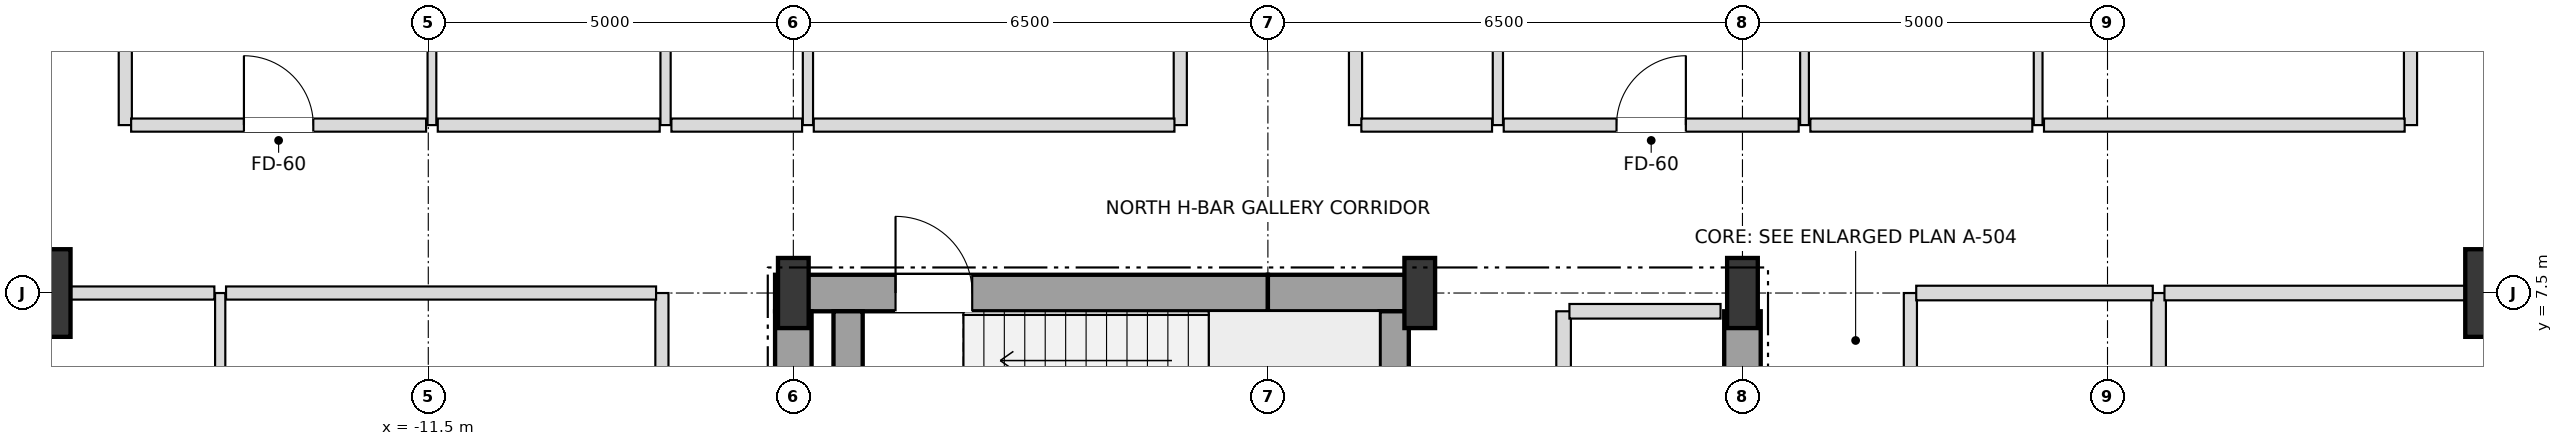
"""IFC4 building model, lengths in metres.
Left out: names, types, materials, properties, quantities, classifications, styles, units other than length and angle.
Written with IfcOpenShell. Run it as: python <this file> out.ifc"""

import sys

from ifc_helpers import new_model, si_unit, direction, frame, frame_2d, origin, origin_2d, place, context, subcontext, project, spatial, rectangle, i_section, extrude, element, fill, save


model = new_model("IFC4")
c1 = context("Model", 3, precision=1e-05, world=origin(), true_north=direction((0.0, 1.0)))
c2 = subcontext(c1, "Body", "Model", "MODEL_VIEW")
j1 = project(units=[si_unit("LENGTHUNIT", "METRE"), si_unit("PLANEANGLEUNIT", "RADIAN")], contexts=[c1])
p1 = place(None, origin())
s1 = spatial("IfcSite", under=j1, at=p1, CompositionType="ELEMENT")
p2 = place(p1, origin())
s2 = spatial("IfcBuilding", under=s1, at=p2, CompositionType="ELEMENT")
p3 = place(p2, frame((0.0, 0.0, 125.1)))
s3 = spatial("IfcBuildingStorey", under=s2, at=p3, CompositionType="ELEMENT", Elevation=125.1)
for number, where, z_axis, x_axis in (
    (1, (-6.5, 7.5, 0.0), (0.0, 0.0, 1.0), (1.0, 0.0, 0.0)),
    (2, (2.08, 7.5, 0.0), (0.0, 0.0, 1.0), (1.0, 0.0, 0.0)),
    (3, (6.5, 7.5, 0.0), (0.0, 0.0, 1.0), (1.0, 0.0, 0.0)),
):
    element("IfcColumn", number, at=place(p3, frame(where, z_axis=z_axis, x_axis=x_axis)), inside=s3, PredefinedType="COLUMN", context=c2, shape_type="SweptSolid", body=[
        extrude(i_section(OverallWidth=0.42, OverallDepth=0.96, WebThickness=0.022, FlangeThickness=0.034, at=origin_2d()), origin(), (0.0, 0.0, 1.0), 4.5),
    ])
for number, where, z_axis, x_axis in (
    (4, (17.0, 7.5, 0.0), (0.0, 0.0, 1.0), (1.0, 0.0, 0.0)),
    (5, (-17.0, 7.5, 0.0), (0.0, 0.0, 1.0), (1.0, 0.0, 0.0)),
):
    element("IfcColumn", number, at=place(p3, frame(where, z_axis=z_axis, x_axis=x_axis)), inside=s3, PredefinedType="USERDEFINED", context=c2, shape_type="SweptSolid", body=[
        extrude(rectangle(XDim=1.2, YDim=1.2, at=origin_2d()), origin(), (0.0, 0.0, 1.0), 4.5),
    ])
p4 = place(p3, frame((-6.75, 7.5, 0.0), z_axis=(0.0, 0.0, 1.0), x_axis=(1.0, 0.0, 0.0)))
e6 = element("IfcWall", 6, at=p4, inside=s3, PredefinedType="SHEAR", context=c2, shape_type="SweptSolid", body=[
    extrude(rectangle(XDim=6.75, YDim=0.5, at=frame_2d((3.375, 0.0))), origin(), (0.0, 0.0, 1.0), 4.28),
])
p5 = place(p4, frame((1.65, 0.0, 0.0)))
e7 = element("IfcOpeningElement", 7, at=p5, cuts=e6, PredefinedType="OPENING", context=c2, shape_type="SweptSolid", body=[
    extrude(rectangle(XDim=1.05, YDim=2.15, at=frame_2d((0.525, 1.075))), frame((0.0, 0.26, 0.0), z_axis=(0.0, -1.0, 0.0), x_axis=(1.0, 0.0, 0.0)), (0.0, 0.0, 1.0), 0.52),
])
p6 = place(p3, frame((0.0, 7.5, 0.0), z_axis=(0.0, 0.0, 1.0), x_axis=(1.0, 0.0, 0.0)))
e8 = element("IfcWall", 8, at=p6, inside=s3, PredefinedType="SHEAR", context=c2, shape_type="SweptSolid", body=[
    extrude(rectangle(XDim=2.08, YDim=0.5, at=frame_2d((1.04, 0.0))), origin(), (0.0, 0.0, 1.0), 4.28),
])
for number, where, z_axis, x_axis in (
    (9, (-6.5, 3.95, 0.0), (0.0, 0.0, 1.0), (0.0, 1.0, 0.0)),
    (10, (6.5, 3.95, 0.0), (0.0, 0.0, 1.0), (0.0, 1.0, 0.0)),
):
    element("IfcWall", number, at=place(p3, frame(where, z_axis=z_axis, x_axis=x_axis)), inside=s3, PredefinedType="SHEAR", context=c2, shape_type="SweptSolid", body=[
        extrude(rectangle(XDim=3.3, YDim=0.5, at=frame_2d((1.65, 0.0))), origin(), (0.0, 0.0, 1.0), 4.28),
    ])
for number, where, z_axis, x_axis in (
    (11, (1.73, 3.95, 0.0), (0.0, 0.0, 1.0), (0.0, 1.0, 0.0)),
    (12, (-5.75, 3.95, 0.0), (0.0, 0.0, 1.0), (0.0, 1.0, 0.0)),
):
    element("IfcWall", number, at=place(p3, frame(where, z_axis=z_axis, x_axis=x_axis)), inside=s3, PredefinedType="SHEAR", context=c2, shape_type="SweptSolid", body=[
        extrude(rectangle(XDim=3.3, YDim=0.4, at=frame_2d((1.65, 0.0))), origin(), (0.0, 0.0, 1.0), 4.28),
    ])
p7 = place(p3, frame((-15.65, 9.8, 0.0), z_axis=(0.0, 0.0, 1.0), x_axis=(0.0, 1.0, 0.0)))
e13 = element("IfcWall", 13, at=p7, inside=s3, PredefinedType="PARTITIONING", context=c2, shape_type="SweptSolid", body=[
    extrude(rectangle(XDim=7.35, YDim=0.18, at=frame_2d((3.675, 0.0))), origin(), (0.0, 0.0, 1.0), 3.636),
])
p8 = place(p3, frame((-14.35, -7.5, 0.0), z_axis=(0.0, 0.0, 1.0), x_axis=(0.0, 1.0, 0.0)))
e14 = element("IfcWall", 14, at=p8, inside=s3, PredefinedType="PARTITIONING", context=c2, shape_type="SweptSolid", body=[
    extrude(rectangle(XDim=15.0, YDim=0.14, at=frame_2d((7.5, 0.0))), origin(), (0.0, 0.0, 1.0), 4.28),
])
p9 = place(p8, frame((3.475, 0.0, 0.0)))
e15 = element("IfcOpeningElement", 15, at=p9, cuts=e14, PredefinedType="OPENING", context=c2, shape_type="SweptSolid", body=[
    extrude(rectangle(XDim=0.95, YDim=2.1, at=frame_2d((0.475, 1.05))), frame((0.0, 0.08, 0.0), z_axis=(0.0, -1.0, 0.0), x_axis=(1.0, 0.0, 0.0)), (0.0, 0.0, 1.0), 0.16),
])
p10 = place(p3, frame((-11.45, 9.8, 0.0), z_axis=(0.0, 0.0, 1.0), x_axis=(0.0, 1.0, 0.0)))
e16 = element("IfcWall", 16, at=p10, inside=s3, PredefinedType="PARTITIONING", context=c2, shape_type="SweptSolid", body=[
    extrude(rectangle(XDim=7.35, YDim=0.12, at=frame_2d((3.675, 0.0))), origin(), (0.0, 0.0, 1.0), 3.636),
])
p11 = place(p10, frame((3.713, 0.0, 0.0)))
e17 = element("IfcOpeningElement", 17, at=p11, cuts=e16, PredefinedType="OPENING", context=c2, shape_type="SweptSolid", body=[
    extrude(rectangle(XDim=0.95, YDim=2.1, at=frame_2d((0.475, 1.05))), frame((0.0, 0.07, 0.0), z_axis=(0.0, -1.0, 0.0), x_axis=(1.0, 0.0, 0.0)), (0.0, 0.0, 1.0), 0.14),
])
p12 = place(p3, frame((-8.3, -7.5, 0.0), z_axis=(0.0, 0.0, 1.0), x_axis=(0.0, 1.0, 0.0)))
e18 = element("IfcWall", 18, at=p12, inside=s3, PredefinedType="PARTITIONING", context=c2, shape_type="SweptSolid", body=[
    extrude(rectangle(XDim=15.0, YDim=0.18, at=frame_2d((7.5, 0.0))), origin(), (0.0, 0.0, 1.0), 4.28),
])
p13 = place(p12, frame((2.495, 0.0, 0.0)))
e19 = element("IfcOpeningElement", 19, at=p13, cuts=e18, PredefinedType="OPENING", context=c2, shape_type="SweptSolid", body=[
    extrude(rectangle(XDim=0.95, YDim=2.15, at=frame_2d((0.475, 1.075))), frame((0.0, 0.1, 0.0), z_axis=(0.0, -1.0, 0.0), x_axis=(1.0, 0.0, 0.0)), (0.0, 0.0, 1.0), 0.2),
])
p14 = place(p3, frame((-8.25, 9.8, 0.0), z_axis=(0.0, 0.0, 1.0), x_axis=(0.0, 1.0, 0.0)))
e20 = element("IfcWall", 20, at=p14, inside=s3, PredefinedType="PARTITIONING", context=c2, shape_type="SweptSolid", body=[
    extrude(rectangle(XDim=7.35, YDim=0.14, at=frame_2d((3.675, 0.0))), origin(), (0.0, 0.0, 1.0), 3.716),
])
p15 = place(p14, frame((3.22, 0.0, 0.0)))
e21 = element("IfcOpeningElement", 21, at=p15, cuts=e20, PredefinedType="OPENING", context=c2, shape_type="SweptSolid", body=[
    extrude(rectangle(XDim=0.9, YDim=2.1, at=frame_2d((0.45, 1.05))), frame((0.0, 0.08, 0.0), z_axis=(0.0, -1.0, 0.0), x_axis=(1.0, 0.0, 0.0)), (0.0, 0.0, 1.0), 0.16),
])
p16 = place(p3, frame((-6.3, 9.8, 0.0), z_axis=(0.0, 0.0, 1.0), x_axis=(0.0, 1.0, 0.0)))
e22 = element("IfcWall", 22, at=p16, inside=s3, PredefinedType="PARTITIONING", context=c2, shape_type="SweptSolid", body=[
    extrude(rectangle(XDim=13.35, YDim=0.14, at=frame_2d((6.675, 0.0))), origin(), (0.0, 0.0, 1.0), 3.716),
])
p17 = place(p16, frame((11.051, 0.0, 0.0)))
e23 = element("IfcOpeningElement", 23, at=p17, cuts=e22, PredefinedType="OPENING", context=c2, shape_type="SweptSolid", body=[
    extrude(rectangle(XDim=0.9, YDim=2.1, at=frame_2d((0.45, 1.05))), frame((0.0, 0.08, 0.0), z_axis=(0.0, -1.0, 0.0), x_axis=(1.0, 0.0, 0.0)), (0.0, 0.0, 1.0), 0.16),
])
for number, where, z_axis, x_axis in (
    (24, (-1.2, 9.8, 0.0), (0.0, 0.0, 1.0), (0.0, 1.0, 0.0)),
    (25, (1.2, 9.8, 0.0), (0.0, 0.0, 1.0), (0.0, 1.0, 0.0)),
):
    element("IfcWall", number, at=place(p3, frame(where, z_axis=z_axis, x_axis=x_axis)), inside=s3, PredefinedType="PARTITIONING", context=c2, shape_type="SweptSolid", body=[
        extrude(rectangle(XDim=13.35, YDim=0.18, at=frame_2d((6.675, 0.0))), origin(), (0.0, 0.0, 1.0), 3.716),
    ])
p18 = place(p3, frame((3.15, 9.8, 0.0), z_axis=(0.0, 0.0, 1.0), x_axis=(0.0, 1.0, 0.0)))
e26 = element("IfcWall", 26, at=p18, inside=s3, PredefinedType="PARTITIONING", context=c2, shape_type="SweptSolid", body=[
    extrude(rectangle(XDim=7.35, YDim=0.14, at=frame_2d((3.675, 0.0))), origin(), (0.0, 0.0, 1.0), 4.28),
])
p19 = place(p18, frame((3.22, 0.0, 0.0)))
e27 = element("IfcOpeningElement", 27, at=p19, cuts=e26, PredefinedType="OPENING", context=c2, shape_type="SweptSolid", body=[
    extrude(rectangle(XDim=0.9, YDim=2.1, at=frame_2d((0.45, 1.05))), frame((0.0, 0.08, 0.0), z_axis=(0.0, -1.0, 0.0), x_axis=(1.0, 0.0, 0.0)), (0.0, 0.0, 1.0), 0.16),
])
p20 = place(p3, frame((4.05, 4.2, 0.0), z_axis=(0.0, 0.0, 1.0), x_axis=(0.0, 1.0, 0.0)))
e28 = element("IfcWall", 28, at=p20, inside=s3, PredefinedType="SOLIDWALL", context=c2, shape_type="SweptSolid", body=[
    extrude(rectangle(XDim=3.05, YDim=0.2, at=frame_2d((1.525, 0.0))), origin(), (0.0, 0.0, 1.0), 4.28),
])
p21 = place(p20, frame((0.975, 0.0, 0.0)))
e29 = element("IfcOpeningElement", 29, at=p21, cuts=e28, PredefinedType="OPENING", context=c2, shape_type="SweptSolid", body=[
    extrude(rectangle(XDim=0.95, YDim=2.15, at=frame_2d((0.475, 1.075))), frame((0.0, 0.11, 0.0), z_axis=(0.0, -1.0, 0.0), x_axis=(1.0, 0.0, 0.0)), (0.0, 0.0, 1.0), 0.22),
])
p22 = place(p3, frame((7.35, 9.8, 0.0), z_axis=(0.0, 0.0, 1.0), x_axis=(0.0, 1.0, 0.0)))
e30 = element("IfcWall", 30, at=p22, inside=s3, PredefinedType="PARTITIONING", context=c2, shape_type="SweptSolid", body=[
    extrude(rectangle(XDim=13.35, YDim=0.12, at=frame_2d((6.675, 0.0))), origin(), (0.0, 0.0, 1.0), 3.716),
])
p23 = place(p22, frame((3.195, 0.0, 0.0)))
e31 = element("IfcOpeningElement", 31, at=p23, cuts=e30, PredefinedType="OPENING", context=c2, shape_type="SweptSolid", body=[
    extrude(rectangle(XDim=0.95, YDim=2.1, at=frame_2d((0.475, 1.05))), frame((0.0, 0.07, 0.0), z_axis=(0.0, -1.0, 0.0), x_axis=(1.0, 0.0, 0.0)), (0.0, 0.0, 1.0), 0.14),
])
p24 = place(p22, frame((11.051, 0.0, 0.0)))
e32 = element("IfcOpeningElement", 32, at=p24, cuts=e30, PredefinedType="OPENING", context=c2, shape_type="SweptSolid", body=[
    extrude(rectangle(XDim=0.9, YDim=2.1, at=frame_2d((0.45, 1.05))), frame((0.0, 0.07, 0.0), z_axis=(0.0, -1.0, 0.0), x_axis=(1.0, 0.0, 0.0)), (0.0, 0.0, 1.0), 0.14),
])
p25 = place(p3, frame((8.8, -7.5, 0.0), z_axis=(0.0, 0.0, 1.0), x_axis=(0.0, 1.0, 0.0)))
e33 = element("IfcWall", 33, at=p25, inside=s3, PredefinedType="PARTITIONING", context=c2, shape_type="SweptSolid", body=[
    extrude(rectangle(XDim=15.0, YDim=0.18, at=frame_2d((7.5, 0.0))), origin(), (0.0, 0.0, 1.0), 4.28),
])
p26 = place(p25, frame((2.425, 0.0, 0.0)))
e34 = element("IfcOpeningElement", 34, at=p26, cuts=e33, PredefinedType="OPENING", context=c2, shape_type="SweptSolid", body=[
    extrude(rectangle(XDim=0.95, YDim=2.15, at=frame_2d((0.475, 1.075))), frame((0.0, 0.1, 0.0), z_axis=(0.0, -1.0, 0.0), x_axis=(1.0, 0.0, 0.0)), (0.0, 0.0, 1.0), 0.2),
])
p27 = place(p25, frame((7.525, 0.0, 0.0)))
e35 = element("IfcOpeningElement", 35, at=p27, cuts=e33, PredefinedType="OPENING", context=c2, shape_type="SweptSolid", body=[
    extrude(rectangle(XDim=0.95, YDim=2.15, at=frame_2d((0.475, 1.075))), frame((0.0, 0.1, 0.0), z_axis=(0.0, -1.0, 0.0), x_axis=(1.0, 0.0, 0.0)), (0.0, 0.0, 1.0), 0.2),
])
p28 = place(p25, frame((12.225, 0.0, 0.0)))
e36 = element("IfcOpeningElement", 36, at=p28, cuts=e33, PredefinedType="OPENING", context=c2, shape_type="SweptSolid", body=[
    extrude(rectangle(XDim=0.95, YDim=2.15, at=frame_2d((0.475, 1.075))), frame((0.0, 0.1, 0.0), z_axis=(0.0, -1.0, 0.0), x_axis=(1.0, 0.0, 0.0)), (0.0, 0.0, 1.0), 0.2),
])
p29 = place(p3, frame((10.55, 9.8, 0.0), z_axis=(0.0, 0.0, 1.0), x_axis=(0.0, 1.0, 0.0)))
e37 = element("IfcWall", 37, at=p29, inside=s3, PredefinedType="PARTITIONING", context=c2, shape_type="SweptSolid", body=[
    extrude(rectangle(XDim=13.35, YDim=0.12, at=frame_2d((6.675, 0.0))), origin(), (0.0, 0.0, 1.0), 3.716),
])
p30 = place(p29, frame((3.713, 0.0, 0.0)))
e38 = element("IfcOpeningElement", 38, at=p30, cuts=e37, PredefinedType="OPENING", context=c2, shape_type="SweptSolid", body=[
    extrude(rectangle(XDim=0.95, YDim=2.1, at=frame_2d((0.475, 1.05))), frame((0.0, 0.07, 0.0), z_axis=(0.0, -1.0, 0.0), x_axis=(1.0, 0.0, 0.0)), (0.0, 0.0, 1.0), 0.14),
])
p31 = place(p29, frame((11.051, 0.0, 0.0)))
e39 = element("IfcOpeningElement", 39, at=p31, cuts=e37, PredefinedType="OPENING", context=c2, shape_type="SweptSolid", body=[
    extrude(rectangle(XDim=0.9, YDim=2.1, at=frame_2d((0.45, 1.05))), frame((0.0, 0.07, 0.0), z_axis=(0.0, -1.0, 0.0), x_axis=(1.0, 0.0, 0.0)), (0.0, 0.0, 1.0), 0.14),
])
p32 = place(p3, frame((12.2, 3.0, 0.0), z_axis=(0.0, 0.0, 1.0), x_axis=(0.0, 1.0, 0.0)))
e40 = element("IfcWall", 40, at=p32, inside=s3, PredefinedType="SOLIDWALL", context=c2, shape_type="SweptSolid", body=[
    extrude(rectangle(XDim=4.5, YDim=0.2, at=frame_2d((2.25, 0.0))), origin(), (0.0, 0.0, 1.0), 4.28),
])
p33 = place(p3, frame((15.65, 9.8, 0.0), z_axis=(0.0, 0.0, 1.0), x_axis=(0.0, 1.0, 0.0)))
e41 = element("IfcWall", 41, at=p33, inside=s3, PredefinedType="PARTITIONING", context=c2, shape_type="SweptSolid", body=[
    extrude(rectangle(XDim=7.35, YDim=0.18, at=frame_2d((3.675, 0.0))), origin(), (0.0, 0.0, 1.0), 3.636),
])
p34 = place(p3, frame((4.13, 7.25, 0.0), z_axis=(0.0, 0.0, 1.0), x_axis=(1.0, 0.0, 0.0)))
e42 = element("IfcWall", 42, at=p34, inside=s3, PredefinedType="SOLIDWALL", context=c2, shape_type="SweptSolid", body=[
    extrude(rectangle(XDim=2.07, YDim=0.2, at=frame_2d((1.035, 0.0))), origin(), (0.0, 0.0, 1.0), 4.28),
])
p35 = place(p3, frame((-20.15, 7.5, 0.0), z_axis=(0.0, 0.0, 1.0), x_axis=(1.0, 0.0, 0.0)))
e43 = element("IfcWall", 43, at=p35, inside=s3, PredefinedType="PARTITIONING", context=c2, shape_type="SweptSolid", body=[
    extrude(rectangle(XDim=5.72, YDim=0.18, at=frame_2d((2.86, 0.0))), origin(), (0.0, 0.0, 1.0), 3.716),
])
p36 = place(p3, frame((-14.27, 7.5, 0.0), z_axis=(0.0, 0.0, 1.0), x_axis=(1.0, 0.0, 0.0)))
e44 = element("IfcWall", 44, at=p36, inside=s3, PredefinedType="PARTITIONING", context=c2, shape_type="SweptSolid", body=[
    extrude(rectangle(XDim=5.89, YDim=0.18, at=frame_2d((2.945, 0.0))), origin(), (0.0, 0.0, 1.0), 3.716),
])
p37 = place(p3, frame((8.88, 7.5, 0.0), z_axis=(0.0, 0.0, 1.0), x_axis=(1.0, 0.0, 0.0)))
e45 = element("IfcWall", 45, at=p37, inside=s3, PredefinedType="SOLIDWALL", context=c2, shape_type="SweptSolid", body=[
    extrude(rectangle(XDim=3.24, YDim=0.2, at=frame_2d((1.62, 0.0))), origin(), (0.0, 0.0, 1.0), 3.716),
])
p38 = place(p3, frame((12.28, 7.5, 0.0), z_axis=(0.0, 0.0, 1.0), x_axis=(1.0, 0.0, 0.0)))
e46 = element("IfcWall", 46, at=p38, inside=s3, PredefinedType="SOLIDWALL", context=c2, shape_type="SweptSolid", body=[
    extrude(rectangle(XDim=7.87, YDim=0.2, at=frame_2d((3.935, 0.0))), origin(), (0.0, 0.0, 1.0), 3.716),
])
p39 = place(p3, frame((-15.57, 9.8, 0.0), z_axis=(0.0, 0.0, 1.0), x_axis=(1.0, 0.0, 0.0)))
e47 = element("IfcWall", 47, at=p39, inside=s3, PredefinedType="PARTITIONING", context=c2, shape_type="SweptSolid", body=[
    extrude(rectangle(XDim=4.04, YDim=0.18, at=frame_2d((2.02, 0.0))), origin(), (0.0, 0.0, 1.0), 4.28),
])
p40 = place(p39, frame((1.545, 0.0, 0.0)))
e48 = element("IfcOpeningElement", 48, at=p40, cuts=e47, PredefinedType="OPENING", context=c2, shape_type="SweptSolid", body=[
    extrude(rectangle(XDim=0.95, YDim=2.15, at=frame_2d((0.475, 1.075))), frame((0.0, 0.1, 0.0), z_axis=(0.0, -1.0, 0.0), x_axis=(1.0, 0.0, 0.0)), (0.0, 0.0, 1.0), 0.2),
])
p41 = place(p3, frame((-11.37, 9.8, 0.0), z_axis=(0.0, 0.0, 1.0), x_axis=(1.0, 0.0, 0.0)))
e49 = element("IfcWall", 49, at=p41, inside=s3, PredefinedType="PARTITIONING", context=c2, shape_type="SweptSolid", body=[
    extrude(rectangle(XDim=3.04, YDim=0.18, at=frame_2d((1.52, 0.0))), origin(), (0.0, 0.0, 1.0), 4.28),
])
p42 = place(p3, frame((-8.17, 9.8, 0.0), z_axis=(0.0, 0.0, 1.0), x_axis=(1.0, 0.0, 0.0)))
e50 = element("IfcWall", 50, at=p42, inside=s3, PredefinedType="PARTITIONING", context=c2, shape_type="SweptSolid", body=[
    extrude(rectangle(XDim=1.79, YDim=0.18, at=frame_2d((0.895, 0.0))), origin(), (0.0, 0.0, 1.0), 3.716),
])
p43 = place(p3, frame((-6.22, 9.8, 0.0), z_axis=(0.0, 0.0, 1.0), x_axis=(1.0, 0.0, 0.0)))
e51 = element("IfcWall", 51, at=p43, inside=s3, PredefinedType="PARTITIONING", context=c2, shape_type="SweptSolid", body=[
    extrude(rectangle(XDim=4.94, YDim=0.18, at=frame_2d((2.47, 0.0))), origin(), (0.0, 0.0, 1.0), 4.28),
])
p44 = place(p3, frame((1.28, 9.8, 0.0), z_axis=(0.0, 0.0, 1.0), x_axis=(1.0, 0.0, 0.0)))
e52 = element("IfcWall", 52, at=p44, inside=s3, PredefinedType="PARTITIONING", context=c2, shape_type="SweptSolid", body=[
    extrude(rectangle(XDim=1.79, YDim=0.18, at=frame_2d((0.895, 0.0))), origin(), (0.0, 0.0, 1.0), 4.28),
])
p45 = place(p3, frame((3.23, 9.8, 0.0), z_axis=(0.0, 0.0, 1.0), x_axis=(1.0, 0.0, 0.0)))
e53 = element("IfcWall", 53, at=p45, inside=s3, PredefinedType="PARTITIONING", context=c2, shape_type="SweptSolid", body=[
    extrude(rectangle(XDim=4.04, YDim=0.18, at=frame_2d((2.02, 0.0))), origin(), (0.0, 0.0, 1.0), 3.716),
])
p46 = place(p45, frame((1.545, 0.0, 0.0)))
e54 = element("IfcOpeningElement", 54, at=p46, cuts=e53, PredefinedType="OPENING", context=c2, shape_type="SweptSolid", body=[
    extrude(rectangle(XDim=0.95, YDim=2.15, at=frame_2d((0.475, 1.075))), frame((0.0, 0.1, 0.0), z_axis=(0.0, -1.0, 0.0), x_axis=(1.0, 0.0, 0.0)), (0.0, 0.0, 1.0), 0.2),
])
p47 = place(p3, frame((7.43, 9.8, 0.0), z_axis=(0.0, 0.0, 1.0), x_axis=(1.0, 0.0, 0.0)))
e55 = element("IfcWall", 55, at=p47, inside=s3, PredefinedType="PARTITIONING", context=c2, shape_type="SweptSolid", body=[
    extrude(rectangle(XDim=3.04, YDim=0.18, at=frame_2d((1.52, 0.0))), origin(), (0.0, 0.0, 1.0), 4.28),
])
p48 = place(p3, frame((10.63, 9.8, 0.0), z_axis=(0.0, 0.0, 1.0), x_axis=(1.0, 0.0, 0.0)))
e56 = element("IfcWall", 56, at=p48, inside=s3, PredefinedType="PARTITIONING", context=c2, shape_type="SweptSolid", body=[
    extrude(rectangle(XDim=4.94, YDim=0.18, at=frame_2d((2.47, 0.0))), origin(), (0.0, 0.0, 1.0), 4.28),
])
p49 = place(p5, origin())
e57 = element("IfcDoor", 57, at=p49, inside=s3, OperationType="SINGLE_SWING_LEFT", PredefinedType="DOOR", context=c2, shape_type="SweptSolid", body=[
    extrude(rectangle(XDim=1.05, YDim=2.15, at=frame_2d((0.525, 1.075))), frame((0.0, 0.025, 0.0), z_axis=(0.0, -1.0, 0.0), x_axis=(1.0, 0.0, 0.0)), (0.0, 0.0, 1.0), 0.05),
])
fill(e7, e57)
p50 = place(p40, origin())
e58 = element("IfcDoor", 58, at=p50, inside=s3, OperationType="SINGLE_SWING_LEFT", PredefinedType="DOOR", context=c2, shape_type="SweptSolid", body=[
    extrude(rectangle(XDim=0.95, YDim=2.15, at=frame_2d((0.475, 1.075))), frame((0.0, 0.025, 0.0), z_axis=(0.0, -1.0, 0.0), x_axis=(1.0, 0.0, 0.0)), (0.0, 0.0, 1.0), 0.05),
])
fill(e48, e58)
p51 = place(p46, origin())
e59 = element("IfcDoor", 59, at=p51, inside=s3, OperationType="SINGLE_SWING_RIGHT", PredefinedType="DOOR", context=c2, shape_type="SweptSolid", body=[
    extrude(rectangle(XDim=0.95, YDim=2.15, at=frame_2d((0.475, 1.075))), frame((0.0, 0.025, 0.0), z_axis=(0.0, -1.0, 0.0), x_axis=(1.0, 0.0, 0.0)), (0.0, 0.0, 1.0), 0.05),
])
fill(e54, e59)
save(model, sys.argv[1])
